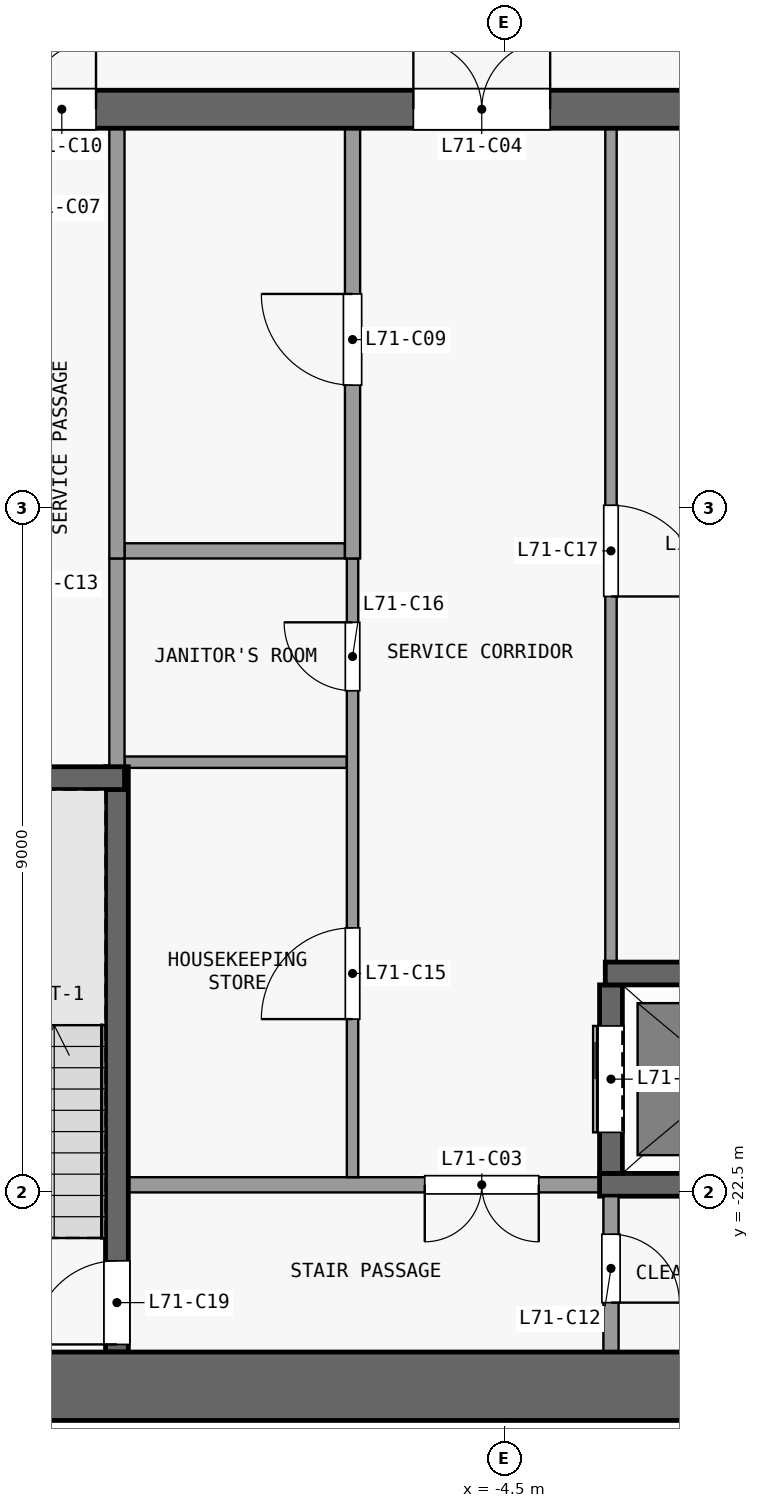
"""IFC4 building model, lengths in metres.
Left out: names, types, materials, properties, quantities, classifications, styles, units other than length and angle.
Written with IfcOpenShell. Run it as: python <this file> out.ifc"""

import sys

from ifc_helpers import new_model, si_unit, direction, frame, frame_2d, origin, place, context, subcontext, project, spatial, rectangle, extrude, element, fill, save


model = new_model("IFC4")
c1 = context("Model", 3, precision=1e-05, world=origin(), true_north=direction((0.0, 1.0)))
c2 = subcontext(c1, "Body", "Model", "MODEL_VIEW")
j1 = project(units=[si_unit("LENGTHUNIT", "METRE"), si_unit("PLANEANGLEUNIT", "RADIAN")], contexts=[c1])
p1 = place(None, origin())
s1 = spatial("IfcSite", under=j1, at=p1, CompositionType="ELEMENT")
p2 = place(p1, origin())
s2 = spatial("IfcBuilding", under=s1, at=p2, CompositionType="ELEMENT")
p3 = place(p2, frame((0.0, 0.0, 280.7)))
s3 = spatial("IfcBuildingStorey", under=s2, at=p3, CompositionType="ELEMENT", Elevation=280.7)
p4 = place(p3, frame((-13.1, -25.05, 0.0), z_axis=(0.0, 0.0, 1.0), x_axis=(1.0, 0.0, 0.0)))
e1 = element("IfcWall", 1, at=p4, inside=s3, PredefinedType="SHEAR", context=c2, shape_type="SweptSolid", body=[
    extrude(rectangle(XDim=26.2, YDim=0.9, at=frame_2d((13.1, 0.0))), origin(), (0.0, 0.0, 1.0), 3.3),
])
p5 = place(p3, frame((-13.1, -8.25, 0.0), z_axis=(0.0, 0.0, 1.0), x_axis=(1.0, 0.0, 0.0)))
e2 = element("IfcWall", 2, at=p5, inside=s3, PredefinedType="SHEAR", context=c2, shape_type="SweptSolid", body=[
    extrude(rectangle(XDim=26.2, YDim=0.5, at=frame_2d((13.1, 0.0))), origin(), (0.0, 0.0, 1.0), 3.3),
])
p6 = place(p5, frame((7.4, 0.0, 0.0)))
e3 = element("IfcOpeningElement", 3, at=p6, cuts=e2, PredefinedType="OPENING", context=c2, shape_type="SweptSolid", body=[
    extrude(rectangle(XDim=1.8, YDim=2.1, at=frame_2d((0.9, 1.05))), frame((0.0, 0.26, 0.0), z_axis=(0.0, -1.0, 0.0), x_axis=(1.0, 0.0, 0.0)), (0.0, 0.0, 1.0), 0.52),
])
p7 = place(p5, frame((17.0, 0.0, 0.0)))
e4 = element("IfcOpeningElement", 4, at=p7, cuts=e2, PredefinedType="OPENING", context=c2, shape_type="SweptSolid", body=[
    extrude(rectangle(XDim=1.8, YDim=2.1, at=frame_2d((0.9, 1.05))), frame((0.0, 0.26, 0.0), z_axis=(0.0, -1.0, 0.0), x_axis=(1.0, 0.0, 0.0)), (0.0, 0.0, 1.0), 0.52),
])
p8 = place(p5, frame((2.325, 0.0, 0.0)))
e5 = element("IfcOpeningElement", 5, at=p8, cuts=e2, PredefinedType="OPENING", context=c2, shape_type="SweptSolid", body=[
    extrude(rectangle(XDim=0.9, YDim=2.1, at=frame_2d((0.45, 1.05))), frame((0.0, 0.26, 0.0), z_axis=(0.0, -1.0, 0.0), x_axis=(1.0, 0.0, 0.0)), (0.0, 0.0, 1.0), 0.52),
])
p9 = place(p5, frame((22.975, 0.0, 0.0)))
e6 = element("IfcOpeningElement", 6, at=p9, cuts=e2, PredefinedType="OPENING", context=c2, shape_type="SweptSolid", body=[
    extrude(rectangle(XDim=0.9, YDim=2.1, at=frame_2d((0.45, 1.05))), frame((0.0, 0.26, 0.0), z_axis=(0.0, -1.0, 0.0), x_axis=(1.0, 0.0, 0.0)), (0.0, 0.0, 1.0), 0.52),
])
p10 = place(p3, frame((-3.25, -22.4, 0.0), z_axis=(0.0, 0.0, 1.0), x_axis=(-1.0, 0.0, 0.0)))
e7 = element("IfcWall", 7, at=p10, inside=s3, PredefinedType="PARTITIONING", context=c2, shape_type="SweptSolid", body=[
    extrude(rectangle(XDim=6.2, YDim=0.2, at=frame_2d((3.1, 0.0))), origin(), (0.0, 0.0, 1.0), 3.3),
])
p11 = place(p10, frame((0.8, 0.0, 0.0)))
e8 = element("IfcOpeningElement", 8, at=p11, cuts=e7, PredefinedType="OPENING", context=c2, shape_type="SweptSolid", body=[
    extrude(rectangle(XDim=1.5, YDim=2.1, at=frame_2d((0.75, 1.05))), frame((0.0, 0.11, 0.0), z_axis=(0.0, -1.0, 0.0), x_axis=(1.0, 0.0, 0.0)), (0.0, 0.0, 1.0), 0.22),
])
p12 = place(p3, frame((-3.25, -22.4, 0.0), z_axis=(0.0, 0.0, 1.0), x_axis=(1.0, 0.0, 0.0)))
e9 = element("IfcWall", 9, at=p12, inside=s3, PredefinedType="SHEAR", context=c2, shape_type="SweptSolid", body=[
    extrude(rectangle(XDim=6.5, YDim=0.3, at=frame_2d((3.25, 0.0))), origin(), (0.0, 0.0, 1.0), 3.3),
])
p13 = place(p3, frame((-3.175, -19.62, 0.0), z_axis=(0.0, 0.0, 1.0), x_axis=(1.0, 0.0, 0.0)))
e10 = element("IfcWall", 10, at=p13, inside=s3, PredefinedType="SHEAR", context=c2, shape_type="SweptSolid", body=[
    extrude(rectangle(XDim=3.025, YDim=0.3, at=frame_2d((1.513, 0.0))), origin(), (0.0, 0.0, 1.0), 3.3),
])
p14 = place(p3, frame((-12.6, -17.05, 0.0), z_axis=(0.0, 0.0, 1.0), x_axis=(1.0, 0.0, 0.0)))
e11 = element("IfcWall", 11, at=p14, inside=s3, PredefinedType="SHEAR", context=c2, shape_type="SweptSolid", body=[
    extrude(rectangle(XDim=3.1, YDim=0.3, at=frame_2d((1.55, 0.0))), origin(), (0.0, 0.0, 1.0), 3.3),
])
p15 = place(p3, frame((-9.5, -16.84, 0.0), z_axis=(0.0, 0.0, 1.0), x_axis=(1.0, 0.0, 0.0)))
e12 = element("IfcWall", 12, at=p15, inside=s3, PredefinedType="PARTITIONING", context=c2, shape_type="SweptSolid", body=[
    extrude(rectangle(XDim=2.925, YDim=0.15, at=frame_2d((1.462, 0.0))), origin(), (0.0, 0.0, 1.0), 3.3),
])
p16 = place(p3, frame((-9.5, -14.06, 0.0), z_axis=(0.0, 0.0, 1.0), x_axis=(1.0, 0.0, 0.0)))
e13 = element("IfcWall", 13, at=p16, inside=s3, PredefinedType="PARTITIONING", context=c2, shape_type="SweptSolid", body=[
    extrude(rectangle(XDim=2.9, YDim=0.2, at=frame_2d((1.45, 0.0))), origin(), (0.0, 0.0, 1.0), 3.3),
])
p17 = place(p3, frame((-9.6, -24.6, 0.0), z_axis=(0.0, 0.0, 1.0), x_axis=(0.0, 1.0, 0.0)))
e14 = element("IfcWall", 14, at=p17, inside=s3, PredefinedType="SHEAR", context=c2, shape_type="SweptSolid", body=[
    extrude(rectangle(XDim=7.7, YDim=0.3, at=frame_2d((3.85, 0.0))), origin(), (0.0, 0.0, 1.0), 3.3),
])
p18 = place(p17, frame((0.1, 0.0, 0.0)))
e15 = element("IfcOpeningElement", 15, at=p18, cuts=e14, PredefinedType="OPENING", context=c2, shape_type="SweptSolid", body=[
    extrude(rectangle(XDim=1.1, YDim=2.1, at=frame_2d((0.55, 1.05))), frame((0.0, 0.16, 0.0), z_axis=(0.0, -1.0, 0.0), x_axis=(1.0, 0.0, 0.0)), (0.0, 0.0, 1.0), 0.32),
])
p19 = place(p3, frame((-9.6, -16.9, 0.0), z_axis=(0.0, 0.0, 1.0), x_axis=(0.0, 1.0, 0.0)))
e16 = element("IfcWall", 16, at=p19, inside=s3, PredefinedType="PARTITIONING", context=c2, shape_type="SweptSolid", body=[
    extrude(rectangle(XDim=2.74, YDim=0.2, at=frame_2d((1.37, 0.0))), origin(), (0.0, 0.0, 1.0), 3.3),
])
p20 = place(p3, frame((-9.6, -14.16, 0.0), z_axis=(0.0, 0.0, 1.0), x_axis=(0.0, 1.0, 0.0)))
e17 = element("IfcWall", 17, at=p20, inside=s3, PredefinedType="PARTITIONING", context=c2, shape_type="SweptSolid", body=[
    extrude(rectangle(XDim=5.66, YDim=0.2, at=frame_2d((2.83, 0.0))), origin(), (0.0, 0.0, 1.0), 3.3),
])
p21 = place(p3, frame((-6.5, -22.3, 0.0), z_axis=(0.0, 0.0, 1.0), x_axis=(0.0, 1.0, 0.0)))
e18 = element("IfcWall", 18, at=p21, inside=s3, PredefinedType="PARTITIONING", context=c2, shape_type="SweptSolid", body=[
    extrude(rectangle(XDim=8.14, YDim=0.15, at=frame_2d((4.07, 0.0))), origin(), (0.0, 0.0, 1.0), 3.3),
])
p22 = place(p21, frame((2.08, 0.0, 0.0)))
e19 = element("IfcOpeningElement", 19, at=p22, cuts=e18, PredefinedType="OPENING", context=c2, shape_type="SweptSolid", body=[
    extrude(rectangle(XDim=1.2, YDim=2.1, at=frame_2d((0.6, 1.05))), frame((0.0, 0.085, 0.0), z_axis=(0.0, -1.0, 0.0), x_axis=(1.0, 0.0, 0.0)), (0.0, 0.0, 1.0), 0.17),
])
p23 = place(p21, frame((6.4, 0.0, 0.0)))
e20 = element("IfcOpeningElement", 20, at=p23, cuts=e18, PredefinedType="OPENING", context=c2, shape_type="SweptSolid", body=[
    extrude(rectangle(XDim=0.9, YDim=2.1, at=frame_2d((0.45, 1.05))), frame((0.0, 0.085, 0.0), z_axis=(0.0, -1.0, 0.0), x_axis=(1.0, 0.0, 0.0)), (0.0, 0.0, 1.0), 0.17),
])
p24 = place(p3, frame((-6.5, -14.16, 0.0), z_axis=(0.0, 0.0, 1.0), x_axis=(0.0, 1.0, 0.0)))
e21 = element("IfcWall", 21, at=p24, inside=s3, PredefinedType="PARTITIONING", context=c2, shape_type="SweptSolid", body=[
    extrude(rectangle(XDim=5.66, YDim=0.2, at=frame_2d((2.83, 0.0))), origin(), (0.0, 0.0, 1.0), 3.3),
])
p25 = place(p24, frame((2.28, 0.0, 0.0)))
e22 = element("IfcOpeningElement", 22, at=p25, cuts=e21, PredefinedType="OPENING", context=c2, shape_type="SweptSolid", body=[
    extrude(rectangle(XDim=1.2, YDim=2.1, at=frame_2d((0.6, 1.05))), frame((0.0, 0.11, 0.0), z_axis=(0.0, -1.0, 0.0), x_axis=(1.0, 0.0, 0.0)), (0.0, 0.0, 1.0), 0.22),
])
p26 = place(p3, frame((-3.1, -22.55, 0.0), z_axis=(0.0, 0.0, 1.0), x_axis=(0.0, -1.0, 0.0)))
e23 = element("IfcWall", 23, at=p26, inside=s3, PredefinedType="PARTITIONING", context=c2, shape_type="SweptSolid", body=[
    extrude(rectangle(XDim=2.05, YDim=0.2, at=frame_2d((1.025, 0.0))), origin(), (0.0, 0.0, 1.0), 3.3),
])
p27 = place(p26, frame((0.5, 0.0, 0.0)))
e24 = element("IfcOpeningElement", 24, at=p27, cuts=e23, PredefinedType="OPENING", context=c2, shape_type="SweptSolid", body=[
    extrude(rectangle(XDim=0.9, YDim=2.1, at=frame_2d((0.45, 1.05))), frame((0.0, 0.11, 0.0), z_axis=(0.0, -1.0, 0.0), x_axis=(1.0, 0.0, 0.0)), (0.0, 0.0, 1.0), 0.22),
])
p28 = place(p3, frame((-3.1, -22.25, 0.0), z_axis=(0.0, 0.0, 1.0), x_axis=(0.0, 1.0, 0.0)))
e25 = element("IfcWall", 25, at=p28, inside=s3, PredefinedType="SHEAR", context=c2, shape_type="SweptSolid", body=[
    extrude(rectangle(XDim=2.48, YDim=0.3, at=frame_2d((1.24, 0.0))), origin(), (0.0, 0.0, 1.0), 3.3),
])
p29 = place(p28, frame((0.54, 0.0, 0.0)))
e26 = element("IfcOpeningElement", 26, at=p29, cuts=e25, PredefinedType="OPENING", context=c2, shape_type="SweptSolid", body=[
    extrude(rectangle(XDim=1.4, YDim=2.1, at=frame_2d((0.7, 1.05))), frame((0.0, 0.16, 0.0), z_axis=(0.0, -1.0, 0.0), x_axis=(1.0, 0.0, 0.0)), (0.0, 0.0, 1.0), 0.32),
])
p30 = place(p3, frame((-3.1, -8.5, 0.0), z_axis=(0.0, 0.0, 1.0), x_axis=(0.0, -1.0, 0.0)))
e27 = element("IfcWall", 27, at=p30, inside=s3, PredefinedType="PARTITIONING", context=c2, shape_type="SweptSolid", body=[
    extrude(rectangle(XDim=10.97, YDim=0.15, at=frame_2d((5.485, 0.0))), origin(), (0.0, 0.0, 1.0), 3.3),
])
p31 = place(p30, frame((4.96, 0.0, 0.0)))
e28 = element("IfcOpeningElement", 28, at=p31, cuts=e27, PredefinedType="OPENING", context=c2, shape_type="SweptSolid", body=[
    extrude(rectangle(XDim=1.2, YDim=2.1, at=frame_2d((0.6, 1.05))), frame((0.0, 0.085, 0.0), z_axis=(0.0, -1.0, 0.0), x_axis=(1.0, 0.0, 0.0)), (0.0, 0.0, 1.0), 0.17),
])
p32 = place(p29, origin())
e29 = element("IfcDoor", 29, at=p32, inside=s3, OperationType="DOUBLE_DOOR_SLIDING", PredefinedType="DOOR", context=c2, shape_type="SweptSolid", body=[
    extrude(rectangle(XDim=1.4, YDim=2.1, at=frame_2d((0.7, 1.05))), frame((0.0, 0.025, 0.0), z_axis=(0.0, -1.0, 0.0), x_axis=(1.0, 0.0, 0.0)), (0.0, 0.0, 1.0), 0.05),
])
fill(e26, e29)
p33 = place(p11, origin())
e30 = element("IfcDoor", 30, at=p33, inside=s3, OperationType="DOUBLE_DOOR_SINGLE_SWING", PredefinedType="DOOR", context=c2, shape_type="SweptSolid", body=[
    extrude(rectangle(XDim=1.5, YDim=2.1, at=frame_2d((0.75, 1.05))), frame((0.0, 0.025, 0.0), z_axis=(0.0, -1.0, 0.0), x_axis=(1.0, 0.0, 0.0)), (0.0, 0.0, 1.0), 0.05),
])
fill(e8, e30)
p34 = place(p6, origin())
e31 = element("IfcDoor", 31, at=p34, inside=s3, OperationType="DOUBLE_DOOR_SINGLE_SWING", PredefinedType="DOOR", context=c2, shape_type="SweptSolid", body=[
    extrude(rectangle(XDim=1.8, YDim=2.1, at=frame_2d((0.9, 1.05))), frame((0.0, 0.025, 0.0), z_axis=(0.0, -1.0, 0.0), x_axis=(1.0, 0.0, 0.0)), (0.0, 0.0, 1.0), 0.05),
])
fill(e3, e31)
p35 = place(p25, origin())
e32 = element("IfcDoor", 32, at=p35, inside=s3, OperationType="SINGLE_SWING_RIGHT", PredefinedType="DOOR", context=c2, shape_type="SweptSolid", body=[
    extrude(rectangle(XDim=1.2, YDim=2.1, at=frame_2d((0.6, 1.05))), frame((0.0, 0.025, 0.0), z_axis=(0.0, -1.0, 0.0), x_axis=(1.0, 0.0, 0.0)), (0.0, 0.0, 1.0), 0.05),
])
fill(e22, e32)
p36 = place(p8, origin())
e33 = element("IfcDoor", 33, at=p36, inside=s3, OperationType="SINGLE_SWING_RIGHT", PredefinedType="DOOR", context=c2, shape_type="SweptSolid", body=[
    extrude(rectangle(XDim=0.9, YDim=2.1, at=frame_2d((0.45, 1.05))), frame((0.0, 0.025, 0.0), z_axis=(0.0, -1.0, 0.0), x_axis=(1.0, 0.0, 0.0)), (0.0, 0.0, 1.0), 0.05),
])
fill(e5, e33)
p37 = place(p27, origin())
e34 = element("IfcDoor", 34, at=p37, inside=s3, OperationType="SINGLE_SWING_RIGHT", PredefinedType="DOOR", context=c2, shape_type="SweptSolid", body=[
    extrude(rectangle(XDim=0.9, YDim=2.1, at=frame_2d((0.45, 1.05))), frame((0.0, 0.025, 0.0), z_axis=(0.0, -1.0, 0.0), x_axis=(1.0, 0.0, 0.0)), (0.0, 0.0, 1.0), 0.05),
])
fill(e24, e34)
p38 = place(p22, origin())
e35 = element("IfcDoor", 35, at=p38, inside=s3, OperationType="SINGLE_SWING_LEFT", PredefinedType="DOOR", context=c2, shape_type="SweptSolid", body=[
    extrude(rectangle(XDim=1.2, YDim=2.1, at=frame_2d((0.6, 1.05))), frame((0.0, 0.025, 0.0), z_axis=(0.0, -1.0, 0.0), x_axis=(1.0, 0.0, 0.0)), (0.0, 0.0, 1.0), 0.05),
])
fill(e19, e35)
p39 = place(p23, origin())
e36 = element("IfcDoor", 36, at=p39, inside=s3, OperationType="SINGLE_SWING_RIGHT", PredefinedType="DOOR", context=c2, shape_type="SweptSolid", body=[
    extrude(rectangle(XDim=0.9, YDim=2.1, at=frame_2d((0.45, 1.05))), frame((0.0, 0.025, 0.0), z_axis=(0.0, -1.0, 0.0), x_axis=(1.0, 0.0, 0.0)), (0.0, 0.0, 1.0), 0.05),
])
fill(e20, e36)
p40 = place(p31, origin())
e37 = element("IfcDoor", 37, at=p40, inside=s3, OperationType="SINGLE_SWING_RIGHT", PredefinedType="DOOR", context=c2, shape_type="SweptSolid", body=[
    extrude(rectangle(XDim=1.2, YDim=2.1, at=frame_2d((0.6, 1.05))), frame((0.0, 0.025, 0.0), z_axis=(0.0, -1.0, 0.0), x_axis=(1.0, 0.0, 0.0)), (0.0, 0.0, 1.0), 0.05),
])
fill(e28, e37)
p41 = place(p18, origin())
e38 = element("IfcDoor", 38, at=p41, inside=s3, OperationType="SINGLE_SWING_LEFT", PredefinedType="DOOR", context=c2, shape_type="SweptSolid", body=[
    extrude(rectangle(XDim=1.1, YDim=2.1, at=frame_2d((0.55, 1.05))), frame((0.0, 0.025, 0.0), z_axis=(0.0, -1.0, 0.0), x_axis=(1.0, 0.0, 0.0)), (0.0, 0.0, 1.0), 0.05),
])
fill(e15, e38)
save(model, sys.argv[1])
